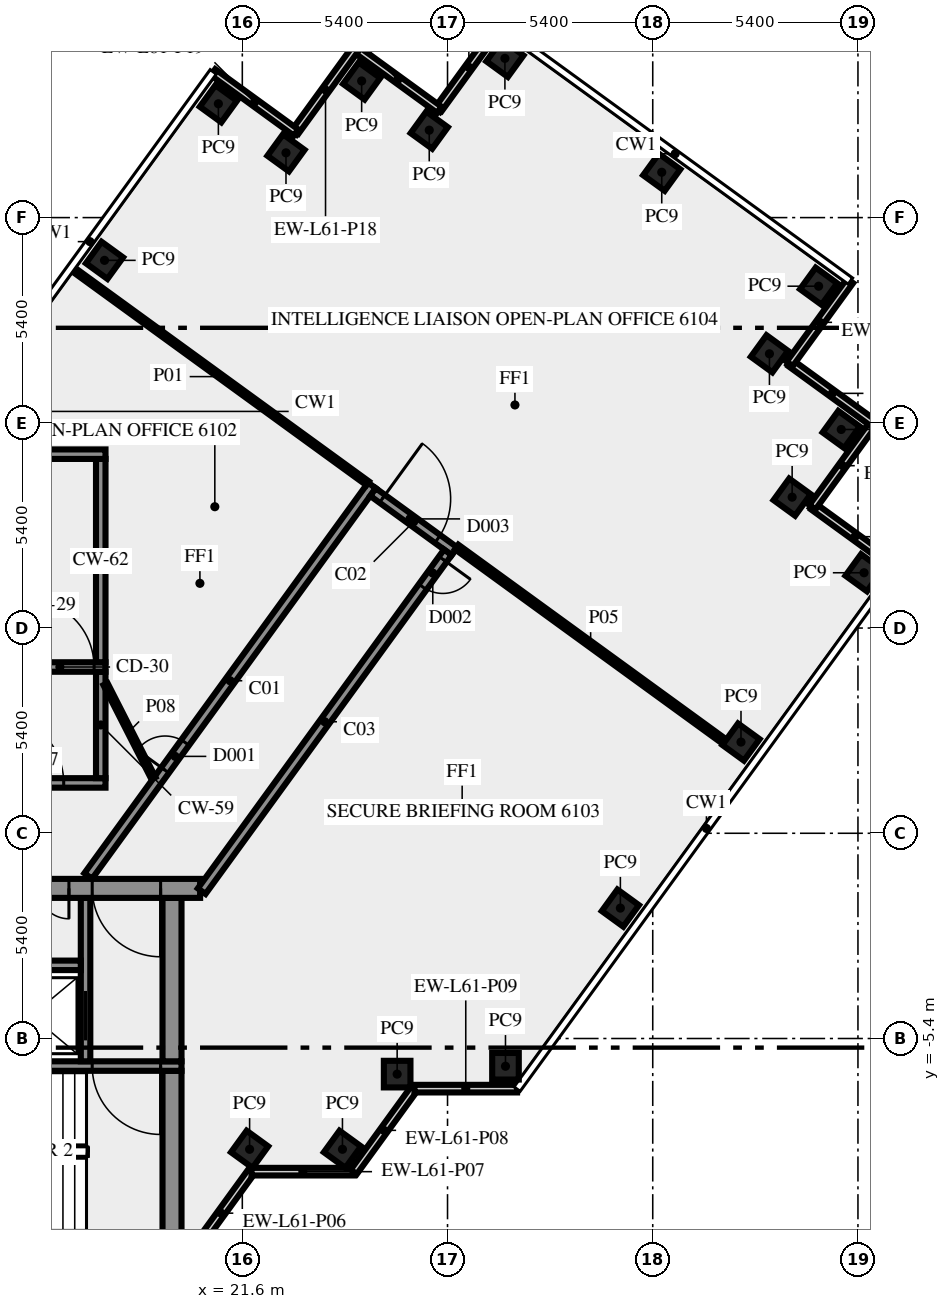
"""IFC4 building model, lengths in metres.
Left out: names, types, materials, properties, quantities, classifications, styles, units other than length and angle.
Written with IfcOpenShell. Run it as: python <this file> out.ifc"""

import sys

from ifc_helpers import new_model, si_unit, direction, frame, frame_2d, origin, origin_2d, place, context, subcontext, project, spatial, rectangle, extrude, element, fill, save


model = new_model("IFC4")
c1 = context("Model", 3, precision=1e-05, world=origin(), true_north=direction((0.0, 1.0)))
c2 = subcontext(c1, "Body", "Model", "MODEL_VIEW")
j1 = project(units=[si_unit("LENGTHUNIT", "METRE"), si_unit("PLANEANGLEUNIT", "RADIAN")], contexts=[c1])
p1 = place(None, origin())
s1 = spatial("IfcSite", under=j1, at=p1, CompositionType="ELEMENT")
p2 = place(p1, origin())
s2 = spatial("IfcBuilding", under=s1, at=p2, CompositionType="ELEMENT")
p3 = place(p2, frame((0.0, 0.0, 261.0)))
s3 = spatial("IfcBuildingStorey", under=s2, at=p3, CompositionType="ELEMENT", Elevation=261.0)
for number, where, z_axis, x_axis in (
    (1, (21.792, -8.315, 0.0), (0.0, 0.0, 1.0), (0.588, 0.809, 0.0)),
    (2, (24.235, -8.315, 0.0), (0.0, 0.0, 1.0), (0.588, 0.809, 0.0)),
    (3, (25.674, -6.337, 0.0), (0.0, 0.0, 1.0), (1.0, 0.0, 0.0)),
    (4, (28.525, -6.13, 0.0), (0.0, 0.0, 1.0), (1.0, 0.0, 0.0)),
    (5, (31.548, -1.969, 0.0), (0.0, 0.0, 1.0), (0.588, 0.809, 0.0)),
    (6, (34.722, 2.4, 0.0), (0.0, 0.0, 1.0), (0.588, 0.809, 0.0)),
    (7, (37.96, 6.855, 0.0), (0.0, 0.0, 1.0), (0.588, 0.809, 0.0)),
    (8, (36.068, 8.844, 0.0), (0.0, 0.0, 1.0), (0.588, 0.809, 0.0)),
    (9, (37.36, 10.625, 0.0), (0.0, 0.0, 1.0), (0.588, 0.809, 0.0)),
    (10, (35.471, 12.616, 0.0), (0.0, 0.0, 1.0), (-0.809, 0.588, 0.0)),
    (11, (36.765, 14.395, 0.0), (0.0, 0.0, 1.0), (-0.809, 0.588, 0.0)),
    (12, (32.637, 17.393, 0.0), (0.0, 0.0, 1.0), (-0.809, 0.588, 0.0)),
    (13, (28.51, 20.39, 0.0), (0.0, 0.0, 1.0), (-0.588, -0.809, 0.0)),
    (14, (26.519, 18.5, 0.0), (0.0, 0.0, 1.0), (-0.809, 0.588, 0.0)),
    (15, (24.74, 19.795, 0.0), (0.0, 0.0, 1.0), (-0.588, -0.809, 0.0)),
    (16, (22.749, 17.904, 0.0), (0.0, 0.0, 1.0), (-0.588, -0.809, 0.0)),
    (17, (20.97, 19.195, 0.0), (0.0, 0.0, 1.0), (-0.588, -0.809, 0.0)),
    (18, (17.974, 15.075, 0.0), (0.0, 0.0, 1.0), (-0.588, -0.809, 0.0)),
):
    element("IfcColumn", number, at=place(p3, frame(where, z_axis=z_axis, x_axis=x_axis)), inside=s3, PredefinedType="COLUMN", context=c2, shape_type="SweptSolid", body=[
        extrude(rectangle(XDim=0.7, YDim=0.7, at=origin_2d()), origin(), (0.0, 0.0, 1.0), 3.65),
    ])
p4 = place(p3, frame((20.253, -11.083, 0.0), z_axis=(0.0, 0.0, 1.0), x_axis=(0.587766567315, 0.809030569476, 0.0)))
e19 = element("IfcWall", 19, at=p4, inside=s3, PredefinedType="SOLIDWALL", context=c2, shape_type="SweptSolid", body=[
    extrude(rectangle(XDim=2.688, YDim=0.2, at=frame_2d((1.344, 0.0))), origin(), (0.0, 0.0, 1.0), 3.65),
])
p5 = place(p3, frame((21.843, -8.904, 0.0), z_axis=(0.0, 0.0, 1.0), x_axis=(1.0, 0.0, 0.0)))
e20 = element("IfcWall", 20, at=p5, inside=s3, PredefinedType="SOLIDWALL", context=c2, shape_type="SweptSolid", body=[
    extrude(rectangle(XDim=2.7, YDim=0.2, at=frame_2d((1.35, 0.0))), origin(), (0.0, 0.0, 1.0), 3.65),
])
p6 = place(p3, frame((24.533, -8.909, 0.0), z_axis=(0.0, 0.0, 1.0), x_axis=(0.587720002413, 0.809064397168, 0.0)))
e21 = element("IfcWall", 21, at=p6, inside=s3, PredefinedType="SOLIDWALL", context=c2, shape_type="SweptSolid", body=[
    extrude(rectangle(XDim=2.7, YDim=0.2, at=frame_2d((1.35, 0.0))), origin(), (0.0, 0.0, 1.0), 3.65),
])
for number, where, z_axis, x_axis in (
    (22, (26.13, -6.719, 0.0), (0.0, 0.0, 1.0), (1.0, 0.0, 0.0)),
    (23, (38.814, 7.01, 0.0), (0.0, 0.0, 1.0), (-0.809, 0.588, 0.0)),
    (24, (36.602, 8.58, 0.0), (0.0, 0.0, 1.0), (0.588, 0.809, 0.0)),
    (25, (38.216, 10.782, 0.0), (0.0, 0.0, 1.0), (-0.809, 0.588, 0.0)),
    (26, (36.005, 12.352, 0.0), (0.0, 0.0, 1.0), (0.588, 0.809, 0.0)),
):
    element("IfcWall", number, at=place(p3, frame(where, z_axis=z_axis, x_axis=x_axis)), inside=s3, PredefinedType="SOLIDWALL", context=c2, shape_type="SweptSolid", body=[
        extrude(rectangle(XDim=2.7, YDim=0.2, at=frame_2d((1.35, 0.0))), origin(), (0.0, 0.0, 1.0), 3.65),
    ])
for number, where, z_axis, x_axis in (
    (27, (28.354, 21.247, 0.0), (0.0, 0.0, 1.0), (-0.588, -0.809, 0.0)),
    (28, (26.785, 19.036, 0.0), (0.0, 0.0, 1.0), (-0.809, 0.588, 0.0)),
):
    element("IfcWall", number, at=place(p3, frame(where, z_axis=z_axis, x_axis=x_axis)), inside=s3, PredefinedType="SOLIDWALL", context=c2, shape_type="SweptSolid", body=[
        extrude(rectangle(XDim=2.7, YDim=0.2, at=frame_2d((1.35, 0.0))), origin(), (0.0, 0.0, 1.0), 3.65),
    ])
for number, where, z_axis, x_axis in (
    (29, (24.583, 20.65, 0.0), (0.0, 0.0, 1.0), (-0.588, -0.809, 0.0)),
    (30, (23.013, 18.438, 0.0), (0.0, 0.0, 1.0), (-0.809, 0.588, 0.0)),
):
    element("IfcWall", number, at=place(p3, frame(where, z_axis=z_axis, x_axis=x_axis)), inside=s3, PredefinedType="SOLIDWALL", context=c2, shape_type="SweptSolid", body=[
        extrude(rectangle(XDim=2.7, YDim=0.2, at=frame_2d((1.35, 0.0))), origin(), (0.0, 0.0, 1.0), 3.65),
    ])
p7 = place(p3, frame((19.75, -10.5, 0.0), z_axis=(0.0, 0.0, 1.0), x_axis=(0.0, 1.0, 0.0)))
e31 = element("IfcWall", 31, at=p7, inside=s3, PredefinedType="SHEAR", context=c2, shape_type="SweptSolid", body=[
    extrude(rectangle(XDim=4.25, YDim=0.5, at=frame_2d((2.125, 0.0))), origin(), (0.0, 0.0, 1.0), 3.65),
])
p8 = place(p3, frame((20.0, -6.125, 0.0), z_axis=(0.0, 0.0, 1.0), x_axis=(-1.0, 0.0, 0.0)))
e32 = element("IfcWall", 32, at=p8, inside=s3, PredefinedType="SHEAR", context=c2, shape_type="SweptSolid", body=[
    extrude(rectangle(XDim=10.2, YDim=0.25, at=frame_2d((5.1, 0.0))), origin(), (0.0, 0.0, 1.0), 3.65),
])
p9 = place(p8, frame((0.55, 0.0, 0.0)))
e33 = element("IfcOpeningElement", 33, at=p9, cuts=e32, PredefinedType="OPENING", context=c2, shape_type="SweptSolid", body=[
    extrude(rectangle(XDim=1.8, YDim=2.1, at=frame_2d((0.9, 1.05))), frame((0.0, 0.135, 0.0), z_axis=(0.0, -1.0, 0.0), x_axis=(1.0, 0.0, 0.0)), (0.0, 0.0, 1.0), 0.27),
])
p10 = place(p3, frame((17.475, -6.0, 0.0), z_axis=(0.0, 0.0, 1.0), x_axis=(0.0, 1.0, 0.0)))
e34 = element("IfcWall", 34, at=p10, inside=s3, PredefinedType="SHEAR", context=c2, shape_type="SweptSolid", body=[
    extrude(rectangle(XDim=4.3, YDim=0.25, at=frame_2d((2.15, 0.0))), origin(), (0.0, 0.0, 1.0), 3.65),
])
p11 = place(p10, frame((0.55, 0.0, 0.0)))
e35 = element("IfcOpeningElement", 35, at=p11, cuts=e34, PredefinedType="OPENING", context=c2, shape_type="SweptSolid", body=[
    extrude(rectangle(XDim=1.3, YDim=2.1, at=frame_2d((0.65, 1.05))), frame((0.0, 0.135, 0.0), z_axis=(0.0, -1.0, 0.0), x_axis=(1.0, 0.0, 0.0)), (0.0, 0.0, 1.0), 0.27),
])
p12 = place(p3, frame((19.75, -6.0, 0.0), z_axis=(0.0, 0.0, 1.0), x_axis=(0.0, 1.0, 0.0)))
e36 = element("IfcWall", 36, at=p12, inside=s3, PredefinedType="SHEAR", context=c2, shape_type="SweptSolid", body=[
    extrude(rectangle(XDim=4.3, YDim=0.5, at=frame_2d((2.15, 0.0))), origin(), (0.0, 0.0, 1.0), 3.65),
])
p13 = place(p3, frame((14.1, -3.475, 0.0), z_axis=(0.0, 0.0, 1.0), x_axis=(1.0, 0.0, 0.0)))
e37 = element("IfcWall", 37, at=p13, inside=s3, PredefinedType="SHEAR", context=c2, shape_type="SweptSolid", body=[
    extrude(rectangle(XDim=3.25, YDim=0.25, at=frame_2d((1.625, 0.0))), origin(), (0.0, 0.0, 1.0), 3.65),
])
p14 = place(p3, frame((20.49, -1.45, 0.0), z_axis=(0.0, 0.0, 1.0), x_axis=(-1.0, 0.0, 0.0)))
e38 = element("IfcWall", 38, at=p14, inside=s3, PredefinedType="SHEAR", context=c2, shape_type="SweptSolid", body=[
    extrude(rectangle(XDim=40.98, YDim=0.5, at=frame_2d((20.49, 0.0))), origin(), (0.0, 0.0, 1.0), 3.65),
])
p15 = place(p14, frame((38.14, 0.0, 0.0)))
e39 = element("IfcOpeningElement", 39, at=p15, cuts=e38, PredefinedType="OPENING", context=c2, shape_type="SweptSolid", body=[
    extrude(rectangle(XDim=1.8, YDim=2.1, at=frame_2d((0.9, 1.05))), frame((0.0, 0.26, 0.0), z_axis=(0.0, -1.0, 0.0), x_axis=(1.0, 0.0, 0.0)), (0.0, 0.0, 1.0), 0.52),
])
p16 = place(p14, frame((35.89, 0.0, 0.0)))
e40 = element("IfcOpeningElement", 40, at=p16, cuts=e38, PredefinedType="OPENING", context=c2, shape_type="SweptSolid", body=[
    extrude(rectangle(XDim=0.9, YDim=2.1, at=frame_2d((0.45, 1.05))), frame((0.0, 0.26, 0.0), z_axis=(0.0, -1.0, 0.0), x_axis=(1.0, 0.0, 0.0)), (0.0, 0.0, 1.0), 0.52),
])
p17 = place(p14, frame((32.94, 0.0, 0.0)))
e41 = element("IfcOpeningElement", 41, at=p17, cuts=e38, PredefinedType="OPENING", context=c2, shape_type="SweptSolid", body=[
    extrude(rectangle(XDim=0.9, YDim=2.1, at=frame_2d((0.45, 1.05))), frame((0.0, 0.26, 0.0), z_axis=(0.0, -1.0, 0.0), x_axis=(1.0, 0.0, 0.0)), (0.0, 0.0, 1.0), 0.52),
])
p18 = place(p14, frame((31.015, 0.0, 0.0)))
e42 = element("IfcOpeningElement", 42, at=p18, cuts=e38, PredefinedType="OPENING", context=c2, shape_type="SweptSolid", body=[
    extrude(rectangle(XDim=0.8, YDim=2.1, at=frame_2d((0.4, 1.05))), frame((0.0, 0.26, 0.0), z_axis=(0.0, -1.0, 0.0), x_axis=(1.0, 0.0, 0.0)), (0.0, 0.0, 1.0), 0.52),
])
p19 = place(p14, frame((24.765, 0.0, 0.0)))
e43 = element("IfcOpeningElement", 43, at=p19, cuts=e38, PredefinedType="OPENING", context=c2, shape_type="SweptSolid", body=[
    extrude(rectangle(XDim=0.8, YDim=2.1, at=frame_2d((0.4, 1.05))), frame((0.0, 0.26, 0.0), z_axis=(0.0, -1.0, 0.0), x_axis=(1.0, 0.0, 0.0)), (0.0, 0.0, 1.0), 0.52),
])
p20 = place(p14, frame((21.765, 0.0, 0.0)))
e44 = element("IfcOpeningElement", 44, at=p20, cuts=e38, PredefinedType="OPENING", context=c2, shape_type="SweptSolid", body=[
    extrude(rectangle(XDim=2.0, YDim=2.1, at=frame_2d((1.0, 1.05))), frame((0.0, 0.26, 0.0), z_axis=(0.0, -1.0, 0.0), x_axis=(1.0, 0.0, 0.0)), (0.0, 0.0, 1.0), 0.52),
])
p21 = place(p14, frame((14.202, 0.0, 0.0)))
e45 = element("IfcOpeningElement", 45, at=p21, cuts=e38, PredefinedType="OPENING", context=c2, shape_type="SweptSolid", body=[
    extrude(rectangle(XDim=0.9, YDim=2.1, at=frame_2d((0.45, 1.05))), frame((0.0, 0.26, 0.0), z_axis=(0.0, -1.0, 0.0), x_axis=(1.0, 0.0, 0.0)), (0.0, 0.0, 1.0), 0.52),
])
p22 = place(p14, frame((10.478, 0.0, 0.0)))
e46 = element("IfcOpeningElement", 46, at=p22, cuts=e38, PredefinedType="OPENING", context=c2, shape_type="SweptSolid", body=[
    extrude(rectangle(XDim=0.9, YDim=2.1, at=frame_2d((0.45, 1.05))), frame((0.0, 0.26, 0.0), z_axis=(0.0, -1.0, 0.0), x_axis=(1.0, 0.0, 0.0)), (0.0, 0.0, 1.0), 0.52),
])
p23 = place(p14, frame((7.14, 0.0, 0.0)))
e47 = element("IfcOpeningElement", 47, at=p23, cuts=e38, PredefinedType="OPENING", context=c2, shape_type="SweptSolid", body=[
    extrude(rectangle(XDim=0.9, YDim=2.1, at=frame_2d((0.45, 1.05))), frame((0.0, 0.26, 0.0), z_axis=(0.0, -1.0, 0.0), x_axis=(1.0, 0.0, 0.0)), (0.0, 0.0, 1.0), 0.52),
])
p24 = place(p14, frame((5.028, 0.0, 0.0)))
e48 = element("IfcOpeningElement", 48, at=p24, cuts=e38, PredefinedType="OPENING", context=c2, shape_type="SweptSolid", body=[
    extrude(rectangle(XDim=0.8, YDim=2.1, at=frame_2d((0.4, 1.05))), frame((0.0, 0.26, 0.0), z_axis=(0.0, -1.0, 0.0), x_axis=(1.0, 0.0, 0.0)), (0.0, 0.0, 1.0), 0.52),
])
p25 = place(p14, frame((3.452, 0.0, 0.0)))
e49 = element("IfcOpeningElement", 49, at=p25, cuts=e38, PredefinedType="OPENING", context=c2, shape_type="SweptSolid", body=[
    extrude(rectangle(XDim=0.8, YDim=2.1, at=frame_2d((0.4, 1.05))), frame((0.0, 0.26, 0.0), z_axis=(0.0, -1.0, 0.0), x_axis=(1.0, 0.0, 0.0)), (0.0, 0.0, 1.0), 0.52),
])
p26 = place(p14, frame((1.04, 0.0, 0.0)))
e50 = element("IfcOpeningElement", 50, at=p26, cuts=e38, PredefinedType="OPENING", context=c2, shape_type="SweptSolid", body=[
    extrude(rectangle(XDim=1.8, YDim=2.1, at=frame_2d((0.9, 1.05))), frame((0.0, 0.26, 0.0), z_axis=(0.0, -1.0, 0.0), x_axis=(1.0, 0.0, 0.0)), (0.0, 0.0, 1.0), 0.52),
])
p27 = place(p3, frame((14.1, 1.325, 0.0), z_axis=(0.0, 0.0, 1.0), x_axis=(1.0, 0.0, 0.0)))
e51 = element("IfcWall", 51, at=p27, inside=s3, PredefinedType="SHEAR", context=c2, shape_type="SweptSolid", body=[
    extrude(rectangle(XDim=3.9, YDim=0.25, at=frame_2d((1.95, 0.0))), origin(), (0.0, 0.0, 1.0), 3.65),
])
p28 = place(p27, frame((1.0, 0.0, 0.0)))
e52 = element("IfcOpeningElement", 52, at=p28, cuts=e51, PredefinedType="OPENING", context=c2, shape_type="SweptSolid", body=[
    extrude(rectangle(XDim=1.8, YDim=2.1, at=frame_2d((0.9, 1.05))), frame((0.0, 0.135, 0.0), z_axis=(0.0, -1.0, 0.0), x_axis=(1.0, 0.0, 0.0)), (0.0, 0.0, 1.0), 0.27),
])
p29 = place(p3, frame((17.875, 1.45, 0.0), z_axis=(0.0, 0.0, 1.0), x_axis=(0.0, 1.0, 0.0)))
e53 = element("IfcWall", 53, at=p29, inside=s3, PredefinedType="SHEAR", context=c2, shape_type="SweptSolid", body=[
    extrude(rectangle(XDim=2.8, YDim=0.25, at=frame_2d((1.4, 0.0))), origin(), (0.0, 0.0, 1.0), 3.65),
])
p30 = place(p3, frame((7.5, 4.375, 0.0), z_axis=(0.0, 0.0, 1.0), x_axis=(1.0, 0.0, 0.0)))
e54 = element("IfcWall", 54, at=p30, inside=s3, PredefinedType="SHEAR", context=c2, shape_type="SweptSolid", body=[
    extrude(rectangle(XDim=10.5, YDim=0.25, at=frame_2d((5.25, 0.0))), origin(), (0.0, 0.0, 1.0), 3.65),
])
p31 = place(p30, frame((8.4, 0.0, 0.0)))
e55 = element("IfcOpeningElement", 55, at=p31, cuts=e54, PredefinedType="OPENING", context=c2, shape_type="SweptSolid", body=[
    extrude(rectangle(XDim=1.8, YDim=2.1, at=frame_2d((0.9, 1.05))), frame((0.0, 0.135, 0.0), z_axis=(0.0, -1.0, 0.0), x_axis=(1.0, 0.0, 0.0)), (0.0, 0.0, 1.0), 0.27),
])
p32 = place(p3, frame((17.875, 4.5, 0.0), z_axis=(0.0, 0.0, 1.0), x_axis=(0.0, 1.0, 0.0)))
e56 = element("IfcWall", 56, at=p32, inside=s3, PredefinedType="SHEAR", context=c2, shape_type="SweptSolid", body=[
    extrude(rectangle(XDim=5.35, YDim=0.25, at=frame_2d((2.675, 0.0))), origin(), (0.0, 0.0, 1.0), 3.65),
])
p33 = place(p3, frame((7.5, 9.975, 0.0), z_axis=(0.0, 0.0, 1.0), x_axis=(1.0, 0.0, 0.0)))
e57 = element("IfcWall", 57, at=p33, inside=s3, PredefinedType="SHEAR", context=c2, shape_type="SweptSolid", body=[
    extrude(rectangle(XDim=10.5, YDim=0.25, at=frame_2d((5.25, 0.0))), origin(), (0.0, 0.0, 1.0), 3.65),
])
p34 = place(p33, frame((2.0, 0.0, 1.0)))
e58 = element("IfcOpeningElement", 58, at=p34, cuts=e57, PredefinedType="OPENING", context=c2, shape_type="SweptSolid", body=[
    extrude(rectangle(XDim=1.2, YDim=1.2, at=frame_2d((0.6, 0.6))), frame((0.0, 0.135, 0.0), z_axis=(0.0, -1.0, 0.0), x_axis=(1.0, 0.0, 0.0)), (0.0, 0.0, 1.0), 0.27),
])
p35 = place(p3, frame((17.545, -1.125, 0.0), z_axis=(0.0, 0.0, 1.0), x_axis=(0.587796810203, 0.809008596935, 0.0)))
e59 = element("IfcWall", 59, at=p35, inside=s3, PredefinedType="SOLIDWALL", context=c2, shape_type="SweptSolid", body=[
    extrude(rectangle(XDim=12.703, YDim=0.25, at=frame_2d((6.352, 0.0))), origin(), (0.0, 0.0, 1.0), 3.65),
])
p36 = place(p35, frame((3.441, 0.0, 0.0)))
e60 = element("IfcOpeningElement", 60, at=p36, cuts=e59, PredefinedType="OPENING", context=c2, shape_type="SweptSolid", body=[
    extrude(rectangle(XDim=0.9, YDim=2.1, at=frame_2d((0.45, 1.05))), frame((0.0, 0.135, 0.0), z_axis=(0.0, -1.0, 0.0), x_axis=(1.0, 0.0, 0.0)), (0.0, 0.0, 1.0), 0.27),
])
p37 = place(p3, frame((25.039, 8.978, 0.0), z_axis=(0.0, 0.0, 1.0), x_axis=(0.809006914995, -0.587799125119, 0.0)))
e61 = element("IfcWall", 61, at=p37, inside=s3, PredefinedType="SOLIDWALL", context=c2, shape_type="SweptSolid", body=[
    extrude(rectangle(XDim=2.65, YDim=0.25, at=frame_2d((1.325, 0.0))), origin(), (0.0, 0.0, 1.0), 3.65),
])
p38 = place(p37, frame((0.301, 0.0, 0.0)))
e62 = element("IfcOpeningElement", 62, at=p38, cuts=e61, PredefinedType="OPENING", context=c2, shape_type="SweptSolid", body=[
    extrude(rectangle(XDim=1.8, YDim=2.1, at=frame_2d((0.9, 1.05))), frame((0.0, 0.135, 0.0), z_axis=(0.0, -1.0, 0.0), x_axis=(1.0, 0.0, 0.0)), (0.0, 0.0, 1.0), 0.27),
])
p39 = place(p3, frame((27.009, 7.392, 0.0), z_axis=(0.0, 0.0, 1.0), x_axis=(-0.587776457057, -0.809023384414, 0.0)))
e63 = element("IfcWall", 63, at=p39, inside=s3, PredefinedType="SOLIDWALL", context=c2, shape_type="SweptSolid", body=[
    extrude(rectangle(XDim=11.021, YDim=0.25, at=frame_2d((5.51, 0.0))), origin(), (0.0, 0.0, 1.0), 3.65),
])
p40 = place(p39, frame((0.225, 0.0, 0.0)))
e64 = element("IfcOpeningElement", 64, at=p40, cuts=e63, PredefinedType="OPENING", context=c2, shape_type="SweptSolid", body=[
    extrude(rectangle(XDim=0.9, YDim=2.1, at=frame_2d((0.45, 1.05))), frame((0.0, 0.135, 0.0), z_axis=(0.0, -1.0, 0.0), x_axis=(1.0, 0.0, 0.0)), (0.0, 0.0, 1.0), 0.27),
])
p41 = place(p3, frame((24.898, 9.209, 0.0), z_axis=(0.0, 0.0, 1.0), x_axis=(-0.809013490065, 0.587790075531, 0.0)))
e65 = element("IfcWall", 65, at=p41, inside=s3, PredefinedType="PARTITIONING", context=c2, shape_type="SweptSolid", body=[
    extrude(rectangle(XDim=9.549, YDim=0.12, at=frame_2d((4.775, 0.0))), origin(), (0.0, 0.0, 1.0), 2.95),
])
p42 = place(p3, frame((27.24, 7.532, 0.0), z_axis=(0.0, 0.0, 1.0), x_axis=(0.809027940177, -0.587770186393, 0.0)))
e66 = element("IfcWall", 66, at=p42, inside=s3, PredefinedType="PARTITIONING", context=c2, shape_type="SweptSolid", body=[
    extrude(rectangle(XDim=8.715, YDim=0.15, at=frame_2d((4.357, 0.0))), origin(), (0.0, 0.0, 1.0), 3.65),
])
p43 = place(p3, frame((18.0, 3.925, 0.0), z_axis=(0.0, 0.0, 1.0), x_axis=(0.453950796792, -0.891026752736, 0.0)))
e67 = element("IfcWall", 67, at=p43, inside=s3, PredefinedType="PARTITIONING", context=c2, shape_type="SweptSolid", body=[
    extrude(rectangle(XDim=2.778, YDim=0.12, at=frame_2d((1.389, 0.0))), origin(), (0.0, 0.0, 1.0), 3.65),
])
p44 = place(p9, origin())
e68 = element("IfcDoor", 68, at=p44, inside=s3, OperationType="DOUBLE_DOOR_SINGLE_SWING", PredefinedType="DOOR", context=c2, shape_type="SweptSolid", body=[
    extrude(rectangle(XDim=1.8, YDim=2.1, at=frame_2d((0.9, 1.05))), frame((0.0, 0.025, 0.0), z_axis=(0.0, -1.0, 0.0), x_axis=(1.0, 0.0, 0.0)), (0.0, 0.0, 1.0), 0.05),
])
fill(e33, e68)
p45 = place(p11, origin())
e69 = element("IfcDoor", 69, at=p45, inside=s3, OperationType="DOUBLE_DOOR_SLIDING", PredefinedType="DOOR", context=c2, shape_type="SweptSolid", body=[
    extrude(rectangle(XDim=1.3, YDim=2.1, at=frame_2d((0.65, 1.05))), frame((0.0, 0.025, 0.0), z_axis=(0.0, -1.0, 0.0), x_axis=(1.0, 0.0, 0.0)), (0.0, 0.0, 1.0), 0.05),
])
fill(e35, e69)
p46 = place(p25, origin())
e70 = element("IfcDoor", 70, at=p46, inside=s3, OperationType="SINGLE_SWING_LEFT", PredefinedType="DOOR", context=c2, shape_type="SweptSolid", body=[
    extrude(rectangle(XDim=0.8, YDim=2.1, at=frame_2d((0.4, 1.05))), frame((0.0, 0.025, 0.0), z_axis=(0.0, -1.0, 0.0), x_axis=(1.0, 0.0, 0.0)), (0.0, 0.0, 1.0), 0.05),
])
fill(e49, e70)
p47 = place(p26, origin())
e71 = element("IfcDoor", 71, at=p47, inside=s3, OperationType="DOUBLE_DOOR_SINGLE_SWING", PredefinedType="DOOR", context=c2, shape_type="SweptSolid", body=[
    extrude(rectangle(XDim=1.8, YDim=2.1, at=frame_2d((0.9, 1.05))), frame((0.0, 0.025, 0.0), z_axis=(0.0, -1.0, 0.0), x_axis=(1.0, 0.0, 0.0)), (0.0, 0.0, 1.0), 0.05),
])
fill(e50, e71)
p48 = place(p28, origin())
e72 = element("IfcDoor", 72, at=p48, inside=s3, OperationType="DOUBLE_DOOR_SINGLE_SWING", PredefinedType="DOOR", context=c2, shape_type="SweptSolid", body=[
    extrude(rectangle(XDim=1.8, YDim=2.1, at=frame_2d((0.9, 1.05))), frame((0.0, 0.025, 0.0), z_axis=(0.0, -1.0, 0.0), x_axis=(1.0, 0.0, 0.0)), (0.0, 0.0, 1.0), 0.05),
])
fill(e52, e72)
p49 = place(p31, origin())
e73 = element("IfcDoor", 73, at=p49, inside=s3, OperationType="DOUBLE_DOOR_SINGLE_SWING", PredefinedType="DOOR", context=c2, shape_type="SweptSolid", body=[
    extrude(rectangle(XDim=1.8, YDim=2.1, at=frame_2d((0.9, 1.05))), frame((0.0, 0.025, 0.0), z_axis=(0.0, -1.0, 0.0), x_axis=(1.0, 0.0, 0.0)), (0.0, 0.0, 1.0), 0.05),
])
fill(e55, e73)
p50 = place(p36, origin())
e74 = element("IfcDoor", 74, at=p50, inside=s3, OperationType="SINGLE_SWING_LEFT", PredefinedType="DOOR", context=c2, shape_type="SweptSolid", body=[
    extrude(rectangle(XDim=0.9, YDim=2.1, at=frame_2d((0.45, 1.05))), frame((0.0, 0.025, 0.0), z_axis=(0.0, -1.0, 0.0), x_axis=(1.0, 0.0, 0.0)), (0.0, 0.0, 1.0), 0.05),
])
fill(e60, e74)
p51 = place(p38, origin())
e75 = element("IfcDoor", 75, at=p51, inside=s3, OperationType="DOUBLE_DOOR_SINGLE_SWING", PredefinedType="DOOR", context=c2, shape_type="SweptSolid", body=[
    extrude(rectangle(XDim=1.8, YDim=2.1, at=frame_2d((0.9, 1.05))), frame((0.0, 0.025, 0.0), z_axis=(0.0, -1.0, 0.0), x_axis=(1.0, 0.0, 0.0)), (0.0, 0.0, 1.0), 0.05),
])
fill(e62, e75)
p52 = place(p40, origin())
e76 = element("IfcDoor", 76, at=p52, inside=s3, OperationType="SINGLE_SWING_LEFT", PredefinedType="DOOR", context=c2, shape_type="SweptSolid", body=[
    extrude(rectangle(XDim=0.9, YDim=2.1, at=frame_2d((0.45, 1.05))), frame((0.0, 0.025, 0.0), z_axis=(0.0, -1.0, 0.0), x_axis=(1.0, 0.0, 0.0)), (0.0, 0.0, 1.0), 0.05),
])
fill(e64, e76)
save(model, sys.argv[1])
